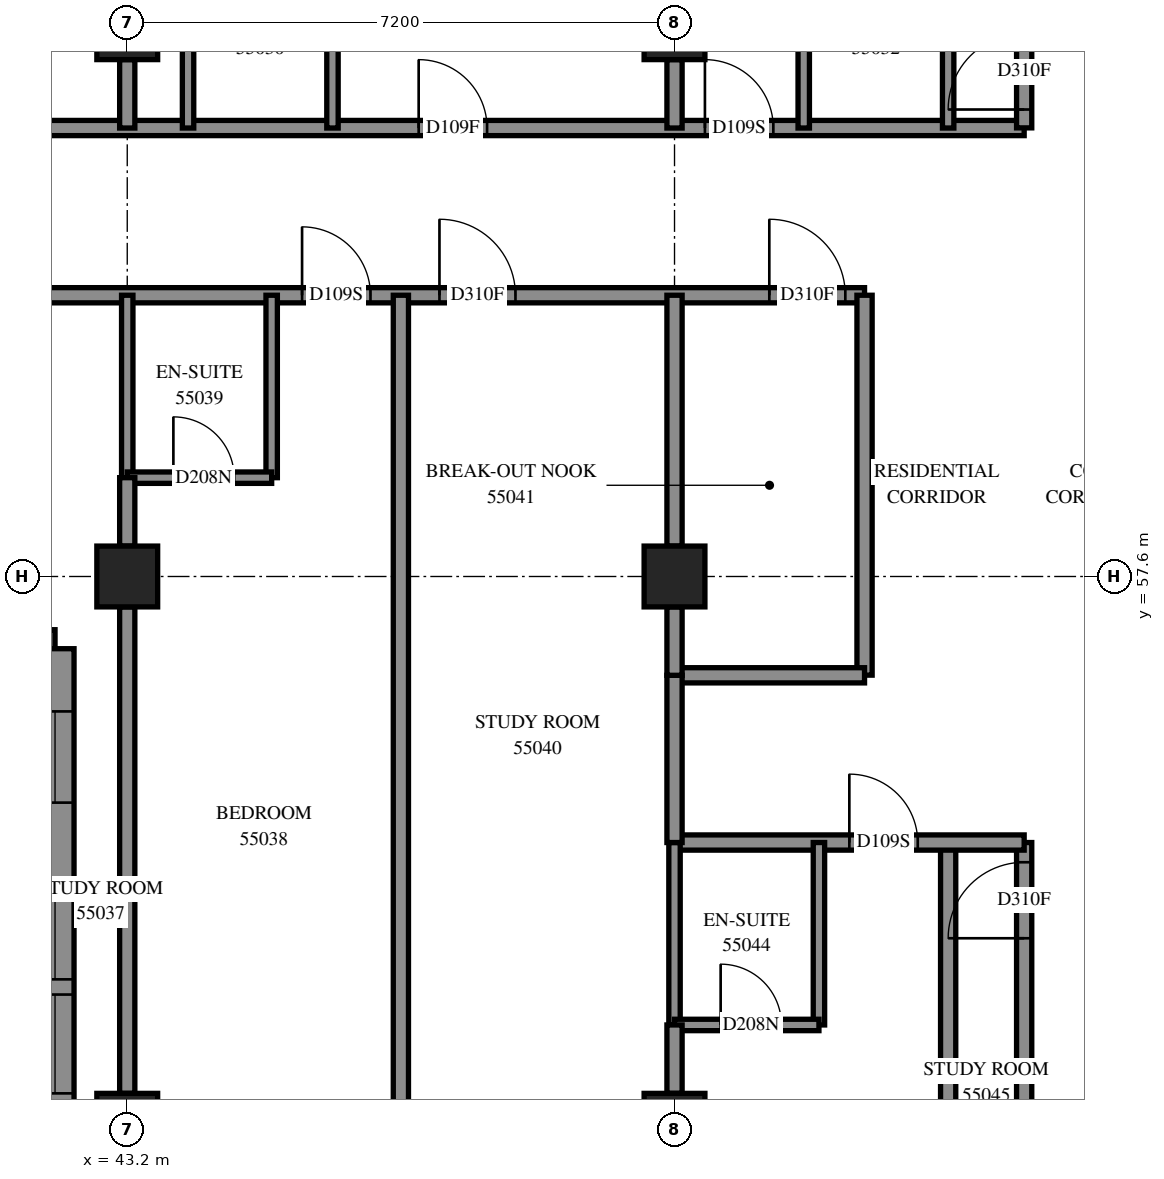
"""IFC4 building model, lengths in metres.
Left out: names, types, materials, properties, quantities, classifications, styles, units other than length and angle.
Written with IfcOpenShell. Run it as: python <this file> out.ifc"""

import sys

from ifc_helpers import new_model, si_unit, direction, frame, frame_2d, origin, origin_2d, place, context, subcontext, project, spatial, polyline, rectangle, outline, extrude, element, fill, save


model = new_model("IFC4")
c1 = context("Model", 3, precision=1e-05, world=origin(), true_north=direction((0.0, 1.0)))
c2 = subcontext(c1, "Body", "Model", "MODEL_VIEW")
j1 = project(units=[si_unit("LENGTHUNIT", "METRE"), si_unit("PLANEANGLEUNIT", "RADIAN")], contexts=[c1])
p1 = place(None, origin())
s1 = spatial("IfcSite", under=j1, at=p1, CompositionType="ELEMENT")
p2 = place(p1, origin())
s2 = spatial("IfcBuilding", under=s1, at=p2, CompositionType="ELEMENT")
p3 = place(p2, frame((0.0, 0.0, 203.2)))
s3 = spatial("IfcBuildingStorey", under=s2, at=p3, CompositionType="ELEMENT", Elevation=203.2)
for number, where, z_axis, x_axis in (
    (1, (43.2, 50.4, 0.0), (0.0, 0.0, 1.0), (1.0, 0.0, 0.0)),
    (2, (43.2, 57.6, 0.0), (0.0, 0.0, 1.0), (1.0, 0.0, 0.0)),
    (3, (43.2, 64.8, 0.0), (0.0, 0.0, 1.0), (1.0, 0.0, 0.0)),
    (4, (50.4, 50.4, 0.0), (0.0, 0.0, 1.0), (1.0, 0.0, 0.0)),
    (5, (50.4, 57.6, 0.0), (0.0, 0.0, 1.0), (1.0, 0.0, 0.0)),
    (6, (50.4, 64.8, 0.0), (0.0, 0.0, 1.0), (1.0, 0.0, 0.0)),
):
    element("IfcColumn", number, at=place(p3, frame(where, z_axis=z_axis, x_axis=x_axis)), inside=s3, PredefinedType="COLUMN", context=c2, shape_type="SweptSolid", body=[
        extrude(rectangle(XDim=0.8, YDim=0.8, at=origin_2d()), origin(), (0.0, 0.0, 1.0), 3.1),
    ])
p4 = place(p3, frame((35.05, 56.65, 0.0), z_axis=(0.0, 0.0, 1.0), x_axis=(1.0, 0.0, 0.0)))
e7 = element("IfcWall", 7, at=p4, inside=s3, PredefinedType="SOLIDWALL", context=c2, shape_type="SweptSolid", body=[
    extrude(outline(polyline([(-0.25, -0.25), (6.95, -0.25), (7.45, 0.25), (0.25, 0.25), (-0.25, -0.25)])), origin(), (0.0, 0.0, 1.0), 3.1),
])
p5 = place(p4, frame((1.35, 0.0, 0.45)))
e8 = element("IfcOpeningElement", 8, at=p5, cuts=e7, PredefinedType="OPENING", context=c2, shape_type="SweptSolid", body=[
    extrude(rectangle(XDim=1.3, YDim=2.5, at=frame_2d((0.65, 1.25))), frame((0.0, 0.26, 0.0), z_axis=(0.0, -1.0, 0.0), x_axis=(1.0, 0.0, 0.0)), (0.0, 0.0, 1.0), 0.52),
])
p6 = place(p4, frame((2.85, 0.0, 0.45)))
e9 = element("IfcOpeningElement", 9, at=p6, cuts=e7, PredefinedType="OPENING", context=c2, shape_type="SweptSolid", body=[
    extrude(rectangle(XDim=1.3, YDim=2.5, at=frame_2d((0.65, 1.25))), frame((0.0, 0.26, 0.0), z_axis=(0.0, -1.0, 0.0), x_axis=(1.0, 0.0, 0.0)), (0.0, 0.0, 1.0), 0.52),
])
p7 = place(p4, frame((5.175, 0.0, 0.45)))
e10 = element("IfcOpeningElement", 10, at=p7, cuts=e7, PredefinedType="OPENING", context=c2, shape_type="SweptSolid", body=[
    extrude(rectangle(XDim=1.2, YDim=2.5, at=frame_2d((0.6, 1.25))), frame((0.0, 0.26, 0.0), z_axis=(0.0, -1.0, 0.0), x_axis=(1.0, 0.0, 0.0)), (0.0, 0.0, 1.0), 0.52),
])
p8 = place(p3, frame((42.25, 56.65, 0.0), z_axis=(0.0, 0.0, 1.0), x_axis=(0.0, -1.0, 0.0)))
e11 = element("IfcWall", 11, at=p8, inside=s3, PredefinedType="SOLIDWALL", context=c2, shape_type="SweptSolid", body=[
    extrude(outline(polyline([(0.25, -0.25), (7.45, -0.25), (6.95, 0.25), (-0.25, 0.25), (0.25, -0.25)])), origin(), (0.0, 0.0, 1.0), 3.1),
])
p9 = place(p8, frame((3.05, 0.0, 0.45)))
e12 = element("IfcOpeningElement", 12, at=p9, cuts=e11, PredefinedType="OPENING", context=c2, shape_type="SweptSolid", body=[
    extrude(rectangle(XDim=1.3, YDim=2.5, at=frame_2d((0.65, 1.25))), frame((0.0, 0.26, 0.0), z_axis=(0.0, -1.0, 0.0), x_axis=(1.0, 0.0, 0.0)), (0.0, 0.0, 1.0), 0.52),
])
p10 = place(p8, frame((4.55, 0.0, 0.45)))
e13 = element("IfcOpeningElement", 13, at=p10, cuts=e11, PredefinedType="OPENING", context=c2, shape_type="SweptSolid", body=[
    extrude(rectangle(XDim=1.3, YDim=2.5, at=frame_2d((0.65, 1.25))), frame((0.0, 0.26, 0.0), z_axis=(0.0, -1.0, 0.0), x_axis=(1.0, 0.0, 0.0)), (0.0, 0.0, 1.0), 0.52),
])
p11 = place(p8, frame((0.825, 0.0, 0.45)))
e14 = element("IfcOpeningElement", 14, at=p11, cuts=e11, PredefinedType="OPENING", context=c2, shape_type="SweptSolid", body=[
    extrude(rectangle(XDim=1.2, YDim=2.5, at=frame_2d((0.6, 1.25))), frame((0.0, 0.26, 0.0), z_axis=(0.0, -1.0, 0.0), x_axis=(1.0, 0.0, 0.0)), (0.0, 0.0, 1.0), 0.52),
])
p12 = place(p3, frame((36.0, 61.3, 0.0), z_axis=(0.0, 0.0, 1.0), x_axis=(1.0, 0.0, 0.0)))
e15 = element("IfcWall", 15, at=p12, inside=s3, PredefinedType="PARTITIONING", context=c2, shape_type="SweptSolid", body=[
    extrude(rectangle(XDim=16.9, YDim=0.2, at=frame_2d((8.45, 0.0))), origin(), (0.0, 0.0, 1.0), 3.1),
])
p13 = place(p12, frame((2.3, 0.0, 0.0)))
e16 = element("IfcOpeningElement", 16, at=p13, cuts=e15, PredefinedType="OPENING", context=c2, shape_type="SweptSolid", body=[
    extrude(rectangle(XDim=0.9, YDim=2.1, at=frame_2d((0.45, 1.05))), frame((0.0, 0.11, 0.0), z_axis=(0.0, -1.0, 0.0), x_axis=(1.0, 0.0, 0.0)), (0.0, 0.0, 1.0), 0.22),
])
p14 = place(p12, frame((4.107, 0.0, 0.0)))
e17 = element("IfcOpeningElement", 17, at=p14, cuts=e15, PredefinedType="OPENING", context=c2, shape_type="SweptSolid", body=[
    extrude(rectangle(XDim=1.0, YDim=2.1, at=frame_2d((0.5, 1.05))), frame((0.0, 0.11, 0.0), z_axis=(0.0, -1.0, 0.0), x_axis=(1.0, 0.0, 0.0)), (0.0, 0.0, 1.0), 0.22),
])
p15 = place(p12, frame((9.5, 0.0, 0.0)))
e18 = element("IfcOpeningElement", 18, at=p15, cuts=e15, PredefinedType="OPENING", context=c2, shape_type="SweptSolid", body=[
    extrude(rectangle(XDim=0.9, YDim=2.1, at=frame_2d((0.45, 1.05))), frame((0.0, 0.11, 0.0), z_axis=(0.0, -1.0, 0.0), x_axis=(1.0, 0.0, 0.0)), (0.0, 0.0, 1.0), 0.22),
])
p16 = place(p12, frame((11.307, 0.0, 0.0)))
e19 = element("IfcOpeningElement", 19, at=p16, cuts=e15, PredefinedType="OPENING", context=c2, shape_type="SweptSolid", body=[
    extrude(rectangle(XDim=1.0, YDim=2.1, at=frame_2d((0.5, 1.05))), frame((0.0, 0.11, 0.0), z_axis=(0.0, -1.0, 0.0), x_axis=(1.0, 0.0, 0.0)), (0.0, 0.0, 1.0), 0.22),
])
p17 = place(p12, frame((15.647, 0.0, 0.0)))
e20 = element("IfcOpeningElement", 20, at=p17, cuts=e15, PredefinedType="OPENING", context=c2, shape_type="SweptSolid", body=[
    extrude(rectangle(XDim=1.0, YDim=2.1, at=frame_2d((0.5, 1.05))), frame((0.0, 0.11, 0.0), z_axis=(0.0, -1.0, 0.0), x_axis=(1.0, 0.0, 0.0)), (0.0, 0.0, 1.0), 0.22),
])
p18 = place(p3, frame((40.702, 63.5, 0.0), z_axis=(0.0, 0.0, 1.0), x_axis=(1.0, 0.0, 0.0)))
e21 = element("IfcWall", 21, at=p18, inside=s3, PredefinedType="PARTITIONING", context=c2, shape_type="SweptSolid", body=[
    extrude(rectangle(XDim=14.298, YDim=0.2, at=frame_2d((7.149, 0.0))), origin(), (0.0, 0.0, 1.0), 3.1),
])
p19 = place(p18, frame((6.332, 0.0, 0.0)))
e22 = element("IfcOpeningElement", 22, at=p19, cuts=e21, PredefinedType="OPENING", context=c2, shape_type="SweptSolid", body=[
    extrude(rectangle(XDim=0.9, YDim=2.1, at=frame_2d((0.45, 1.05))), frame((0.0, 0.11, 0.0), z_axis=(0.0, -1.0, 0.0), x_axis=(1.0, 0.0, 0.0)), (0.0, 0.0, 1.0), 0.22),
])
p20 = place(p18, frame((10.098, 0.0, 0.0)))
e23 = element("IfcOpeningElement", 23, at=p20, cuts=e21, PredefinedType="OPENING", context=c2, shape_type="SweptSolid", body=[
    extrude(rectangle(XDim=0.9, YDim=2.1, at=frame_2d((0.45, 1.05))), frame((0.0, 0.11, 0.0), z_axis=(0.0, -1.0, 0.0), x_axis=(1.0, 0.0, 0.0)), (0.0, 0.0, 1.0), 0.22),
])
p21 = place(p3, frame((54.0, 42.363, 0.0), z_axis=(0.0, 0.0, 1.0), x_axis=(0.0, 1.0, 0.0)))
e24 = element("IfcWall", 24, at=p21, inside=s3, PredefinedType="PARTITIONING", context=c2, shape_type="SweptSolid", body=[
    extrude(rectangle(XDim=11.737, YDim=0.2, at=frame_2d((5.869, 0.0))), origin(), (0.0, 0.0, 1.0), 3.1),
])
p22 = place(p3, frame((46.8, 49.7, 0.0), z_axis=(0.0, 0.0, 1.0), x_axis=(0.0, 1.0, 0.0)))
e25 = element("IfcWall", 25, at=p22, inside=s3, PredefinedType="PARTITIONING", context=c2, shape_type="SweptSolid", body=[
    extrude(rectangle(XDim=11.6, YDim=0.2, at=frame_2d((5.8, 0.0))), origin(), (0.0, 0.0, 1.0), 3.1),
])
p23 = place(p3, frame((43.2, 50.8, 0.0), z_axis=(0.0, 0.0, 1.0), x_axis=(0.0, 1.0, 0.0)))
e26 = element("IfcWall", 26, at=p23, inside=s3, PredefinedType="PARTITIONING", context=c2, shape_type="SweptSolid", body=[
    extrude(rectangle(XDim=6.4, YDim=0.2, at=frame_2d((3.2, 0.0))), origin(), (0.0, 0.0, 1.0), 2.6),
])
p24 = place(p3, frame((55.0, 47.8, 0.0), z_axis=(0.0, 0.0, 1.0), x_axis=(0.0, 1.0, 0.0)))
e27 = element("IfcWall", 27, at=p24, inside=s3, PredefinedType="PARTITIONING", context=c2, shape_type="SweptSolid", body=[
    extrude(rectangle(XDim=6.3, YDim=0.2, at=frame_2d((3.15, 0.0))), origin(), (0.0, 0.0, 1.0), 3.1),
])
p25 = place(p24, frame((5.041, 0.0, 0.0)))
e28 = element("IfcOpeningElement", 28, at=p25, cuts=e27, PredefinedType="OPENING", context=c2, shape_type="SweptSolid", body=[
    extrude(rectangle(XDim=1.0, YDim=2.1, at=frame_2d((0.5, 1.05))), frame((0.0, 0.11, 0.0), z_axis=(0.0, -1.0, 0.0), x_axis=(1.0, 0.0, 0.0)), (0.0, 0.0, 1.0), 0.22),
])
p26 = place(p3, frame((52.9, 56.302, 0.0), z_axis=(0.0, 0.0, 1.0), x_axis=(0.0, 1.0, 0.0)))
e29 = element("IfcWall", 29, at=p26, inside=s3, PredefinedType="PARTITIONING", context=c2, shape_type="SweptSolid", body=[
    extrude(rectangle(XDim=4.998, YDim=0.2, at=frame_2d((2.499, 0.0))), origin(), (0.0, 0.0, 1.0), 3.1),
])
p27 = place(p3, frame((50.4, 54.1, 0.0), z_axis=(0.0, 0.0, 1.0), x_axis=(1.0, 0.0, 0.0)))
e30 = element("IfcWall", 30, at=p27, inside=s3, PredefinedType="PARTITIONING", context=c2, shape_type="SweptSolid", body=[
    extrude(rectangle(XDim=4.6, YDim=0.2, at=frame_2d((2.3, 0.0))), origin(), (0.0, 0.0, 1.0), 3.1),
])
p28 = place(p27, frame((2.3, 0.0, 0.0)))
e31 = element("IfcOpeningElement", 31, at=p28, cuts=e30, PredefinedType="OPENING", context=c2, shape_type="SweptSolid", body=[
    extrude(rectangle(XDim=0.9, YDim=2.1, at=frame_2d((0.45, 1.05))), frame((0.0, 0.11, 0.0), z_axis=(0.0, -1.0, 0.0), x_axis=(1.0, 0.0, 0.0)), (0.0, 0.0, 1.0), 0.22),
])
p29 = place(p3, frame((55.0, 63.502, 0.0), z_axis=(0.0, 0.0, 1.0), x_axis=(0.0, 1.0, 0.0)))
e32 = element("IfcWall", 32, at=p29, inside=s3, PredefinedType="PARTITIONING", context=c2, shape_type="SweptSolid", body=[
    extrude(rectangle(XDim=3.898, YDim=0.2, at=frame_2d((1.949, 0.0))), origin(), (0.0, 0.0, 1.0), 3.1),
])
p30 = place(p29, frame((0.242, 0.0, 0.0)))
e33 = element("IfcOpeningElement", 33, at=p30, cuts=e32, PredefinedType="OPENING", context=c2, shape_type="SweptSolid", body=[
    extrude(rectangle(XDim=1.0, YDim=2.1, at=frame_2d((0.5, 1.05))), frame((0.0, 0.11, 0.0), z_axis=(0.0, -1.0, 0.0), x_axis=(1.0, 0.0, 0.0)), (0.0, 0.0, 1.0), 0.22),
])
p31 = place(p3, frame((50.4, 58.0, 0.0), z_axis=(0.0, 0.0, 1.0), x_axis=(0.0, 1.0, 0.0)))
e34 = element("IfcWall", 34, at=p31, inside=s3, PredefinedType="PARTITIONING", context=c2, shape_type="SweptSolid", body=[
    extrude(rectangle(XDim=3.3, YDim=0.2, at=frame_2d((1.65, 0.0))), origin(), (0.0, 0.0, 1.0), 3.1),
])
p32 = place(p3, frame((50.4, 56.3, 0.0), z_axis=(0.0, 0.0, 1.0), x_axis=(1.0, 0.0, 0.0)))
e35 = element("IfcWall", 35, at=p32, inside=s3, PredefinedType="PARTITIONING", context=c2, shape_type="SweptSolid", body=[
    extrude(rectangle(XDim=2.5, YDim=0.2, at=frame_2d((1.25, 0.0))), origin(), (0.0, 0.0, 1.0), 3.1),
])
for number, where, z_axis, x_axis in (
    (36, (44.0, 63.5, 0.0), (0.0, 0.0, 1.0), (0.0, 1.0, 0.0)),
    (37, (45.9, 63.5, 0.0), (0.0, 0.0, 1.0), (0.0, 1.0, 0.0)),
    (38, (52.1, 63.5, 0.0), (0.0, 0.0, 1.0), (0.0, 1.0, 0.0)),
    (39, (54.0, 63.5, 0.0), (0.0, 0.0, 1.0), (0.0, 1.0, 0.0)),
    (40, (45.1, 58.9, 0.0), (0.0, 0.0, 1.0), (0.0, 1.0, 0.0)),
    (41, (43.2, 58.9, 0.0), (0.0, 0.0, 1.0), (0.0, 1.0, 0.0)),
    (42, (52.3, 51.7, 0.0), (0.0, 0.0, 1.0), (0.0, 1.0, 0.0)),
    (43, (50.4, 51.7, 0.0), (0.0, 0.0, 1.0), (0.0, 1.0, 0.0)),
):
    element("IfcWall", number, at=place(p3, frame(where, z_axis=z_axis, x_axis=x_axis)), inside=s3, PredefinedType="PARTITIONING", context=c2, shape_type="SweptSolid", body=[
        extrude(rectangle(XDim=2.4, YDim=0.15, at=frame_2d((1.2, 0.0))), origin(), (0.0, 0.0, 1.0), 3.1),
    ])
p33 = place(p3, frame((50.4, 54.1, 0.0), z_axis=(0.0, 0.0, 1.0), x_axis=(0.0, 1.0, 0.0)))
e44 = element("IfcWall", 44, at=p33, inside=s3, PredefinedType="PARTITIONING", context=c2, shape_type="SweptSolid", body=[
    extrude(rectangle(XDim=2.2, YDim=0.2, at=frame_2d((1.1, 0.0))), origin(), (0.0, 0.0, 1.0), 3.1),
])
p34 = place(p3, frame((43.2, 58.9, 0.0), z_axis=(0.0, 0.0, 1.0), x_axis=(1.0, 0.0, 0.0)))
e45 = element("IfcWall", 45, at=p34, inside=s3, PredefinedType="PARTITIONING", context=c2, shape_type="SweptSolid", body=[
    extrude(rectangle(XDim=1.9, YDim=0.15, at=frame_2d((0.95, 0.0))), origin(), (0.0, 0.0, 1.0), 3.1),
])
p35 = place(p34, frame((0.607, 0.0, 0.0)))
e46 = element("IfcOpeningElement", 46, at=p35, cuts=e45, PredefinedType="OPENING", context=c2, shape_type="SweptSolid", body=[
    extrude(rectangle(XDim=0.8, YDim=2.1, at=frame_2d((0.4, 1.05))), frame((0.0, 0.085, 0.0), z_axis=(0.0, -1.0, 0.0), x_axis=(1.0, 0.0, 0.0)), (0.0, 0.0, 1.0), 0.17),
])
p36 = place(p3, frame((50.4, 51.7, 0.0), z_axis=(0.0, 0.0, 1.0), x_axis=(1.0, 0.0, 0.0)))
e47 = element("IfcWall", 47, at=p36, inside=s3, PredefinedType="PARTITIONING", context=c2, shape_type="SweptSolid", body=[
    extrude(rectangle(XDim=1.9, YDim=0.15, at=frame_2d((0.95, 0.0))), origin(), (0.0, 0.0, 1.0), 3.1),
])
p37 = place(p36, frame((0.607, 0.0, 0.0)))
e48 = element("IfcOpeningElement", 48, at=p37, cuts=e47, PredefinedType="OPENING", context=c2, shape_type="SweptSolid", body=[
    extrude(rectangle(XDim=0.8, YDim=2.1, at=frame_2d((0.4, 1.05))), frame((0.0, 0.085, 0.0), z_axis=(0.0, -1.0, 0.0), x_axis=(1.0, 0.0, 0.0)), (0.0, 0.0, 1.0), 0.17),
])
for number, where, z_axis, x_axis in (
    (49, (43.2, 63.5, 0.0), (0.0, 0.0, 1.0), (0.0, 1.0, 0.0)),
    (50, (50.4, 50.8, 0.0), (0.0, 0.0, 1.0), (0.0, 1.0, 0.0)),
    (51, (50.4, 56.3, 0.0), (0.0, 0.0, 1.0), (0.0, 1.0, 0.0)),
    (52, (50.4, 63.5, 0.0), (0.0, 0.0, 1.0), (0.0, 1.0, 0.0)),
    (53, (43.2, 58.0, 0.0), (0.0, 0.0, 1.0), (0.0, 1.0, 0.0)),
):
    element("IfcWall", number, at=place(p3, frame(where, z_axis=z_axis, x_axis=x_axis)), inside=s3, PredefinedType="PARTITIONING", context=c2, shape_type="SweptSolid", body=[
        extrude(rectangle(XDim=0.9, YDim=0.2, at=frame_2d((0.45, 0.0))), origin(), (0.0, 0.0, 1.0), 3.1),
    ])
p38 = place(p9, origin())
e54 = element("IfcWindow", 54, at=p38, inside=s3, PartitioningType="SINGLE_PANEL", PredefinedType="WINDOW", context=c2, shape_type="SweptSolid", body=[
    extrude(rectangle(XDim=1.3, YDim=2.5, at=frame_2d((0.65, 1.25))), frame((0.0, 0.18, 0.0), z_axis=(0.0, -1.0, 0.0), x_axis=(1.0, 0.0, 0.0)), (0.0, 0.0, 1.0), 0.06),
])
fill(e12, e54)
p39 = place(p10, origin())
e55 = element("IfcWindow", 55, at=p39, inside=s3, PartitioningType="SINGLE_PANEL", PredefinedType="WINDOW", context=c2, shape_type="SweptSolid", body=[
    extrude(rectangle(XDim=1.3, YDim=2.5, at=frame_2d((0.65, 1.25))), frame((0.0, 0.18, 0.0), z_axis=(0.0, -1.0, 0.0), x_axis=(1.0, 0.0, 0.0)), (0.0, 0.0, 1.0), 0.06),
])
fill(e13, e55)
p40 = place(p11, origin())
e56 = element("IfcWindow", 56, at=p40, inside=s3, PartitioningType="SINGLE_PANEL", PredefinedType="WINDOW", context=c2, shape_type="SweptSolid", body=[
    extrude(rectangle(XDim=1.2, YDim=2.5, at=frame_2d((0.6, 1.25))), frame((0.0, 0.18, 0.0), z_axis=(0.0, -1.0, 0.0), x_axis=(1.0, 0.0, 0.0)), (0.0, 0.0, 1.0), 0.06),
])
fill(e14, e56)
p41 = place(p19, origin())
e57 = element("IfcDoor", 57, at=p41, inside=s3, OperationType="SINGLE_SWING_RIGHT", PredefinedType="DOOR", context=c2, shape_type="SweptSolid", body=[
    extrude(rectangle(XDim=0.9, YDim=2.1, at=frame_2d((0.45, 1.05))), frame((0.0, 0.025, 0.0), z_axis=(0.0, -1.0, 0.0), x_axis=(1.0, 0.0, 0.0)), (0.0, 0.0, 1.0), 0.05),
])
fill(e22, e57)
p42 = place(p20, origin())
e58 = element("IfcDoor", 58, at=p42, inside=s3, OperationType="SINGLE_SWING_RIGHT", PredefinedType="DOOR", context=c2, shape_type="SweptSolid", body=[
    extrude(rectangle(XDim=0.9, YDim=2.1, at=frame_2d((0.45, 1.05))), frame((0.0, 0.025, 0.0), z_axis=(0.0, -1.0, 0.0), x_axis=(1.0, 0.0, 0.0)), (0.0, 0.0, 1.0), 0.05),
])
fill(e23, e58)
p43 = place(p30, origin())
e59 = element("IfcDoor", 59, at=p43, inside=s3, OperationType="SINGLE_SWING_LEFT", PredefinedType="DOOR", context=c2, shape_type="SweptSolid", body=[
    extrude(rectangle(XDim=1.0, YDim=2.1, at=frame_2d((0.5, 1.05))), frame((0.0, 0.025, 0.0), z_axis=(0.0, -1.0, 0.0), x_axis=(1.0, 0.0, 0.0)), (0.0, 0.0, 1.0), 0.05),
])
fill(e33, e59)
p44 = place(p15, origin())
e60 = element("IfcDoor", 60, at=p44, inside=s3, OperationType="SINGLE_SWING_LEFT", PredefinedType="DOOR", context=c2, shape_type="SweptSolid", body=[
    extrude(rectangle(XDim=0.9, YDim=2.1, at=frame_2d((0.45, 1.05))), frame((0.0, 0.025, 0.0), z_axis=(0.0, -1.0, 0.0), x_axis=(1.0, 0.0, 0.0)), (0.0, 0.0, 1.0), 0.05),
])
fill(e18, e60)
p45 = place(p35, origin())
e61 = element("IfcDoor", 61, at=p45, inside=s3, OperationType="SINGLE_SWING_RIGHT", PredefinedType="DOOR", context=c2, shape_type="SweptSolid", body=[
    extrude(rectangle(XDim=0.8, YDim=2.1, at=frame_2d((0.4, 1.05))), frame((0.0, 0.025, 0.0), z_axis=(0.0, -1.0, 0.0), x_axis=(1.0, 0.0, 0.0)), (0.0, 0.0, 1.0), 0.05),
])
fill(e46, e61)
p46 = place(p16, origin())
e62 = element("IfcDoor", 62, at=p46, inside=s3, OperationType="SINGLE_SWING_RIGHT", PredefinedType="DOOR", context=c2, shape_type="SweptSolid", body=[
    extrude(rectangle(XDim=1.0, YDim=2.1, at=frame_2d((0.5, 1.05))), frame((0.0, 0.025, 0.0), z_axis=(0.0, -1.0, 0.0), x_axis=(1.0, 0.0, 0.0)), (0.0, 0.0, 1.0), 0.05),
])
fill(e19, e62)
p47 = place(p17, origin())
e63 = element("IfcDoor", 63, at=p47, inside=s3, OperationType="SINGLE_SWING_LEFT", PredefinedType="DOOR", context=c2, shape_type="SweptSolid", body=[
    extrude(rectangle(XDim=1.0, YDim=2.1, at=frame_2d((0.5, 1.05))), frame((0.0, 0.025, 0.0), z_axis=(0.0, -1.0, 0.0), x_axis=(1.0, 0.0, 0.0)), (0.0, 0.0, 1.0), 0.05),
])
fill(e20, e63)
p48 = place(p28, origin())
e64 = element("IfcDoor", 64, at=p48, inside=s3, OperationType="SINGLE_SWING_LEFT", PredefinedType="DOOR", context=c2, shape_type="SweptSolid", body=[
    extrude(rectangle(XDim=0.9, YDim=2.1, at=frame_2d((0.45, 1.05))), frame((0.0, 0.025, 0.0), z_axis=(0.0, -1.0, 0.0), x_axis=(1.0, 0.0, 0.0)), (0.0, 0.0, 1.0), 0.05),
])
fill(e31, e64)
p49 = place(p37, origin())
e65 = element("IfcDoor", 65, at=p49, inside=s3, OperationType="SINGLE_SWING_RIGHT", PredefinedType="DOOR", context=c2, shape_type="SweptSolid", body=[
    extrude(rectangle(XDim=0.8, YDim=2.1, at=frame_2d((0.4, 1.05))), frame((0.0, 0.025, 0.0), z_axis=(0.0, -1.0, 0.0), x_axis=(1.0, 0.0, 0.0)), (0.0, 0.0, 1.0), 0.05),
])
fill(e48, e65)
p50 = place(p25, origin())
e66 = element("IfcDoor", 66, at=p50, inside=s3, OperationType="SINGLE_SWING_RIGHT", PredefinedType="DOOR", context=c2, shape_type="SweptSolid", body=[
    extrude(rectangle(XDim=1.0, YDim=2.1, at=frame_2d((0.5, 1.05))), frame((0.0, 0.025, 0.0), z_axis=(0.0, -1.0, 0.0), x_axis=(1.0, 0.0, 0.0)), (0.0, 0.0, 1.0), 0.05),
])
fill(e28, e66)
save(model, sys.argv[1])
